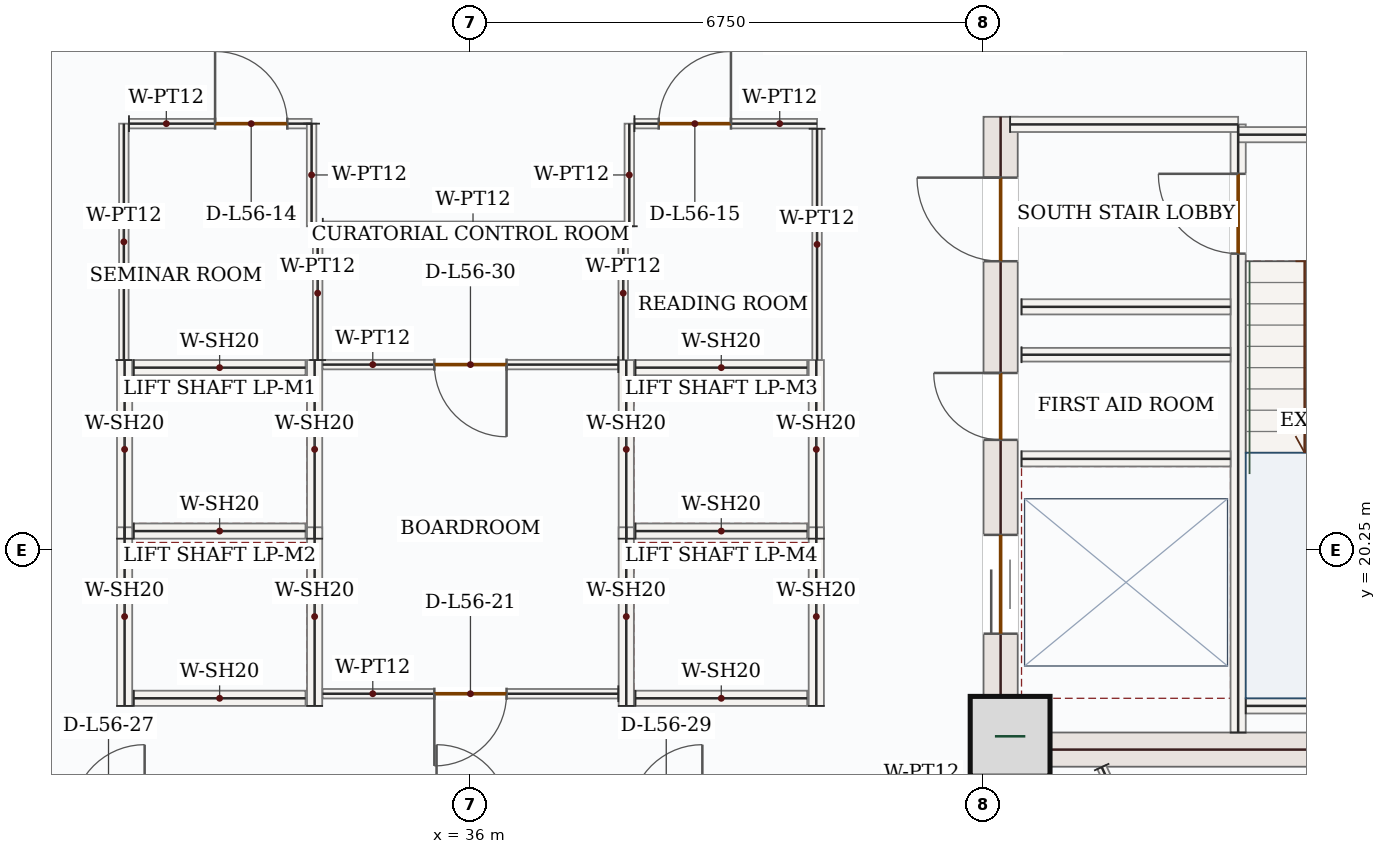
"""IFC4 building model, lengths in metres.
Left out: names, types, materials, properties, quantities, classifications, styles, units other than length and angle.
Written with IfcOpenShell. Run it as: python <this file> out.ifc"""

import sys

from ifc_helpers import new_model, si_unit, direction, frame, frame_2d, origin, origin_2d, place, context, subcontext, project, spatial, rectangle, extrude, source, transform, mapped, element, fill, save


model = new_model("IFC4")
c1 = context("Model", 3, precision=1e-05, world=origin(), true_north=direction((0.0, 1.0)))
c2 = subcontext(c1, "Body", "Model", "MODEL_VIEW")
j1 = project(units=[si_unit("LENGTHUNIT", "METRE"), si_unit("PLANEANGLEUNIT", "RADIAN")], contexts=[c1])
p1 = place(None, origin())
s1 = spatial("IfcSite", under=j1, at=p1, CompositionType="ELEMENT")
p2 = place(p1, origin())
s2 = spatial("IfcBuilding", under=s1, at=p2, CompositionType="ELEMENT")
p3 = place(p2, frame((0.0, 0.0, 239.1)))
s3 = spatial("IfcBuildingStorey", under=s2, at=p3, CompositionType="ELEMENT", Elevation=239.1)
p4 = place(p3, frame((42.975, 17.4, 0.0), z_axis=(0.0, 0.0, 1.0), x_axis=(0.0, 1.0, 0.0)))
e1 = element("IfcWall", 1, at=p4, inside=s3, PredefinedType="SHEAR", context=c2, shape_type="SweptSolid", body=[
    extrude(rectangle(XDim=8.55, YDim=0.45, at=frame_2d((4.275, 0.0))), origin(), (0.0, 0.0, 1.0), 3.5),
])
p5 = place(p4, frame((6.65, 0.0, 0.0)))
e2 = element("IfcOpeningElement", 2, at=p5, cuts=e1, PredefinedType="OPENING", context=c2, shape_type="SweptSolid", body=[
    extrude(rectangle(XDim=1.1, YDim=2.2, at=frame_2d((0.55, 1.1))), frame((0.0, 0.235, 0.0), z_axis=(0.0, -1.0, 0.0), x_axis=(1.0, 0.0, 0.0)), (0.0, 0.0, 1.0), 0.47),
])
p6 = place(p4, frame((1.75, 0.0, 0.0)))
e3 = element("IfcOpeningElement", 3, at=p6, cuts=e1, PredefinedType="OPENING", context=c2, shape_type="SweptSolid", body=[
    extrude(rectangle(XDim=1.3, YDim=2.2, at=frame_2d((0.65, 1.1))), frame((0.0, 0.235, 0.0), z_axis=(0.0, -1.0, 0.0), x_axis=(1.0, 0.0, 0.0)), (0.0, 0.0, 1.0), 0.47),
])
p7 = place(p4, frame((4.3, 0.0, 0.0)))
e4 = element("IfcOpeningElement", 4, at=p7, cuts=e1, PredefinedType="OPENING", context=c2, shape_type="SweptSolid", body=[
    extrude(rectangle(XDim=0.88, YDim=2.1, at=frame_2d((0.44, 1.05))), frame((0.0, 0.235, 0.0), z_axis=(0.0, -1.0, 0.0), x_axis=(1.0, 0.0, 0.0)), (0.0, 0.0, 1.0), 0.47),
])
m1 = source(origin(), c2, "Body", "SweptSolid", [
    extrude(rectangle(XDim=7.1, YDim=0.45, at=frame_2d((3.55, 0.0))), origin(), (0.0, 0.0, 1.0), 3.5),
])
p8 = place(p3, frame((43.2, 17.625, 0.0), z_axis=(0.0, 0.0, 1.0), x_axis=(1.0, 0.0, 0.0)))
e5 = element("IfcWall", 5, at=p8, inside=s3, PredefinedType="SHEAR", context=c2, shape_type="MappedRepresentation", body=[
    mapped(m1, transform((0.0, 0.0, 0.0), x_axis=(1.0, 0.0, 0.0), y_axis=(0.0, 1.0, 0.0), z_axis=(0.0, 0.0, 1.0), scale=1.0)),
])
m2 = source(origin(), c2, "Body", "SweptSolid", [
    extrude(rectangle(XDim=1.05, YDim=1.05, at=origin_2d()), origin(), (0.0, 0.0, 1.0), 3.75),
])
p9 = place(p3, frame((43.1, 17.8, 0.0), z_axis=(0.0, 0.0, 1.0), x_axis=(1.0, 0.0, 0.0)))
e6 = element("IfcColumn", 6, at=p9, inside=s3, PredefinedType="COLUMN", context=c2, shape_type="MappedRepresentation", body=[
    mapped(m2, transform((0.0, 0.0, 0.0), x_axis=(1.0, 0.0, 0.0), y_axis=(0.0, 1.0, 0.0), z_axis=(0.0, 0.0, 1.0), scale=1.0)),
])
p10 = place(p3, frame((46.1, 17.85, 0.0), z_axis=(0.0, 0.0, 1.0), x_axis=(0.0, 1.0, 0.0)))
e7 = element("IfcWall", 7, at=p10, inside=s3, PredefinedType="SOLIDWALL", context=c2, shape_type="SweptSolid", body=[
    extrude(rectangle(XDim=8.0, YDim=0.2, at=frame_2d((4.0, 0.0))), origin(), (0.0, 0.0, 1.0), 3.5),
])
p11 = place(p10, frame((6.3, 0.0, 0.0)))
e8 = element("IfcOpeningElement", 8, at=p11, cuts=e7, PredefinedType="OPENING", context=c2, shape_type="SweptSolid", body=[
    extrude(rectangle(XDim=1.05, YDim=2.15, at=frame_2d((0.525, 1.075))), frame((0.0, 0.11, 0.0), z_axis=(0.0, -1.0, 0.0), x_axis=(1.0, 0.0, 0.0)), (0.0, 0.0, 1.0), 0.22),
])
m3 = source(origin(), c2, "Body", "SweptSolid", [
    extrude(rectangle(XDim=3.0, YDim=0.2, at=frame_2d((1.5, 0.0))), origin(), (0.0, 0.0, 1.0), 3.5),
])
p12 = place(p3, frame((43.1, 25.85, 0.0), z_axis=(0.0, 0.0, 1.0), x_axis=(1.0, 0.0, 0.0)))
e9 = element("IfcWall", 9, at=p12, inside=s3, PredefinedType="SOLIDWALL", context=c2, shape_type="MappedRepresentation", body=[
    mapped(m3, transform((0.0, 0.0, 0.0), x_axis=(1.0, 0.0, 0.0), y_axis=(0.0, 1.0, 0.0), z_axis=(0.0, 0.0, 1.0), scale=1.0)),
])
m4 = source(origin(), c2, "Body", "SweptSolid", [
    extrude(rectangle(XDim=4.25, YDim=0.2, at=frame_2d((2.125, 0.0))), origin(), (0.0, 0.0, 1.0), 3.5),
])
p13 = place(p3, frame((46.1, 25.715, 0.0), z_axis=(0.0, 0.0, 1.0), x_axis=(1.0, 0.0, 0.0)))
e10 = element("IfcWall", 10, at=p13, inside=s3, PredefinedType="SOLIDWALL", context=c2, shape_type="MappedRepresentation", body=[
    mapped(m4, transform((0.0, 0.0, 0.0), x_axis=(1.0, 0.0, 0.0), y_axis=(0.0, 1.0, 0.0), z_axis=(0.0, 0.0, 1.0), scale=1.0)),
])
m5 = source(origin(), c2, "Body", "SweptSolid", [
    extrude(rectangle(XDim=3.25, YDim=0.2, at=frame_2d((1.625, 0.0))), origin(), (0.0, 0.0, 1.0), 3.5),
])
p14 = place(p3, frame((46.2, 18.2, 0.0), z_axis=(0.0, 0.0, 1.0), x_axis=(1.0, 0.0, 0.0)))
e11 = element("IfcWall", 11, at=p14, inside=s3, PredefinedType="SOLIDWALL", context=c2, shape_type="MappedRepresentation", body=[
    mapped(m5, transform((0.0, 0.0, 0.0), x_axis=(1.0, 0.0, 0.0), y_axis=(0.0, 1.0, 0.0), z_axis=(0.0, 0.0, 1.0), scale=1.0)),
])
m6 = source(origin(), c2, "Body", "SweptSolid", [
    extrude(rectangle(XDim=2.75, YDim=0.2, at=frame_2d((1.375, 0.0))), origin(), (0.0, 0.0, 1.0), 3.5),
])
for number, where, z_axis, x_axis in (
    (12, (43.25, 23.45, 0.0), (0.0, 0.0, 1.0), (1.0, 0.0, 0.0)),
    (13, (43.25, 21.45, 0.0), (0.0, 0.0, 1.0), (1.0, 0.0, 0.0)),
):
    element("IfcWall", number, at=place(p3, frame(where, z_axis=z_axis, x_axis=x_axis)), inside=s3, PredefinedType="SOLIDWALL", context=c2, shape_type="MappedRepresentation", body=[
        mapped(m6, transform((0.0, 0.0, 0.0), x_axis=(1.0, 0.0, 0.0), y_axis=(0.0, 1.0, 0.0), z_axis=(0.0, 0.0, 1.0), scale=1.0)),
    ])
m7 = source(origin(), c2, "Body", "SweptSolid", [
    extrude(rectangle(XDim=2.75, YDim=0.18, at=frame_2d((1.375, 0.0))), origin(), (0.0, 0.0, 1.0), 3.5),
])
p15 = place(p3, frame((43.25, 22.82, 0.0), z_axis=(0.0, 0.0, 1.0), x_axis=(1.0, 0.0, 0.0)))
e14 = element("IfcWall", 14, at=p15, inside=s3, PredefinedType="PARTITIONING", context=c2, shape_type="MappedRepresentation", body=[
    mapped(m7, transform((0.0, 0.0, 0.0), x_axis=(1.0, 0.0, 0.0), y_axis=(0.0, 1.0, 0.0), z_axis=(0.0, 0.0, 1.0), scale=1.0)),
])
m8 = source(origin(), c2, "Body", "SweptSolid", [
    extrude(rectangle(XDim=2.35, YDim=0.2, at=frame_2d((1.175, 0.0))), origin(), (0.0, 0.0, 1.0), 3.5),
])
for number, where, z_axis, x_axis in (
    (15, (31.45, 20.4, 0.0), (0.0, 0.0, 1.0), (0.0, 1.0, 0.0)),
    (16, (33.95, 20.4, 0.0), (0.0, 0.0, 1.0), (0.0, 1.0, 0.0)),
):
    element("IfcWall", number, at=place(p3, frame(where, z_axis=z_axis, x_axis=x_axis)), inside=s3, PredefinedType="SOLIDWALL", context=c2, shape_type="MappedRepresentation", body=[
        mapped(m8, transform((0.0, 0.0, 0.0), x_axis=(1.0, 0.0, 0.0), y_axis=(0.0, 1.0, 0.0), z_axis=(0.0, 0.0, 1.0), scale=1.0)),
    ])
m9 = source(origin(), c2, "Body", "SweptSolid", [
    extrude(rectangle(XDim=2.26, YDim=0.2, at=frame_2d((1.13, 0.0))), origin(), (0.0, 0.0, 1.0), 3.5),
])
for number, where, z_axis, x_axis in (
    (17, (31.57, 20.5, 0.0), (0.0, 0.0, 1.0), (1.0, 0.0, 0.0)),
    (18, (31.57, 22.65, 0.0), (0.0, 0.0, 1.0), (1.0, 0.0, 0.0)),
):
    element("IfcWall", number, at=place(p3, frame(where, z_axis=z_axis, x_axis=x_axis)), inside=s3, PredefinedType="SOLIDWALL", context=c2, shape_type="MappedRepresentation", body=[
        mapped(m9, transform((0.0, 0.0, 0.0), x_axis=(1.0, 0.0, 0.0), y_axis=(0.0, 1.0, 0.0), z_axis=(0.0, 0.0, 1.0), scale=1.0)),
    ])
for number, where, z_axis, x_axis in (
    (19, (31.45, 18.2, 0.0), (0.0, 0.0, 1.0), (0.0, 1.0, 0.0)),
    (20, (33.95, 18.2, 0.0), (0.0, 0.0, 1.0), (0.0, 1.0, 0.0)),
):
    element("IfcWall", number, at=place(p3, frame(where, z_axis=z_axis, x_axis=x_axis)), inside=s3, PredefinedType="SOLIDWALL", context=c2, shape_type="MappedRepresentation", body=[
        mapped(m8, transform((0.0, 0.0, 0.0), x_axis=(1.0, 0.0, 0.0), y_axis=(0.0, 1.0, 0.0), z_axis=(0.0, 0.0, 1.0), scale=1.0)),
    ])
p16 = place(p3, frame((31.57, 18.3, 0.0), z_axis=(0.0, 0.0, 1.0), x_axis=(1.0, 0.0, 0.0)))
e21 = element("IfcWall", 21, at=p16, inside=s3, PredefinedType="SOLIDWALL", context=c2, shape_type="MappedRepresentation", body=[
    mapped(m9, transform((0.0, 0.0, 0.0), x_axis=(1.0, 0.0, 0.0), y_axis=(0.0, 1.0, 0.0), z_axis=(0.0, 0.0, 1.0), scale=1.0)),
])
for number, where, z_axis, x_axis in (
    (22, (38.05, 20.4, 0.0), (0.0, 0.0, 1.0), (0.0, 1.0, 0.0)),
    (23, (40.55, 20.4, 0.0), (0.0, 0.0, 1.0), (0.0, 1.0, 0.0)),
):
    element("IfcWall", number, at=place(p3, frame(where, z_axis=z_axis, x_axis=x_axis)), inside=s3, PredefinedType="SOLIDWALL", context=c2, shape_type="MappedRepresentation", body=[
        mapped(m8, transform((0.0, 0.0, 0.0), x_axis=(1.0, 0.0, 0.0), y_axis=(0.0, 1.0, 0.0), z_axis=(0.0, 0.0, 1.0), scale=1.0)),
    ])
for number, where, z_axis, x_axis in (
    (24, (38.17, 20.5, 0.0), (0.0, 0.0, 1.0), (1.0, 0.0, 0.0)),
    (25, (38.17, 22.65, 0.0), (0.0, 0.0, 1.0), (1.0, 0.0, 0.0)),
):
    element("IfcWall", number, at=place(p3, frame(where, z_axis=z_axis, x_axis=x_axis)), inside=s3, PredefinedType="SOLIDWALL", context=c2, shape_type="MappedRepresentation", body=[
        mapped(m9, transform((0.0, 0.0, 0.0), x_axis=(1.0, 0.0, 0.0), y_axis=(0.0, 1.0, 0.0), z_axis=(0.0, 0.0, 1.0), scale=1.0)),
    ])
for number, where, z_axis, x_axis in (
    (26, (38.05, 18.2, 0.0), (0.0, 0.0, 1.0), (0.0, 1.0, 0.0)),
    (27, (40.55, 18.2, 0.0), (0.0, 0.0, 1.0), (0.0, 1.0, 0.0)),
):
    element("IfcWall", number, at=place(p3, frame(where, z_axis=z_axis, x_axis=x_axis)), inside=s3, PredefinedType="SOLIDWALL", context=c2, shape_type="MappedRepresentation", body=[
        mapped(m8, transform((0.0, 0.0, 0.0), x_axis=(1.0, 0.0, 0.0), y_axis=(0.0, 1.0, 0.0), z_axis=(0.0, 0.0, 1.0), scale=1.0)),
    ])
p17 = place(p3, frame((38.17, 18.3, 0.0), z_axis=(0.0, 0.0, 1.0), x_axis=(1.0, 0.0, 0.0)))
e28 = element("IfcWall", 28, at=p17, inside=s3, PredefinedType="SOLIDWALL", context=c2, shape_type="MappedRepresentation", body=[
    mapped(m9, transform((0.0, 0.0, 0.0), x_axis=(1.0, 0.0, 0.0), y_axis=(0.0, 1.0, 0.0), z_axis=(0.0, 0.0, 1.0), scale=1.0)),
])
p18 = place(p3, frame((37.945, 22.69, 0.0), z_axis=(0.0, 0.0, 1.0), x_axis=(-1.0, 0.0, 0.0)))
e29 = element("IfcWall", 29, at=p18, inside=s3, PredefinedType="PARTITIONING", context=c2, shape_type="SweptSolid", body=[
    extrude(rectangle(XDim=3.89, YDim=0.125, at=frame_2d((1.945, 0.0))), origin(), (0.0, 0.0, 1.0), 3.5),
])
p19 = place(p18, frame((1.47, 0.0, 0.0)))
e30 = element("IfcOpeningElement", 30, at=p19, cuts=e29, PredefinedType="OPENING", context=c2, shape_type="SweptSolid", body=[
    extrude(rectangle(XDim=0.95, YDim=2.15, at=frame_2d((0.475, 1.075))), frame((0.0, 0.073, 0.0), z_axis=(0.0, -1.0, 0.0), x_axis=(1.0, 0.0, 0.0)), (0.0, 0.0, 1.0), 0.145),
])
m10 = source(origin(), c2, "Body", "SweptSolid", [
    extrude(rectangle(XDim=1.76, YDim=0.125, at=frame_2d((0.88, 0.0))), origin(), (0.0, 0.0, 1.0), 3.5),
])
p20 = place(p3, frame((33.99, 22.75, 0.0), z_axis=(0.0, 0.0, 1.0), x_axis=(0.0, 1.0, 0.0)))
e31 = element("IfcWall", 31, at=p20, inside=s3, PredefinedType="PARTITIONING", context=c2, shape_type="MappedRepresentation", body=[
    mapped(m10, transform((0.0, 0.0, 0.0), x_axis=(1.0, 0.0, 0.0), y_axis=(0.0, 1.0, 0.0), z_axis=(0.0, 0.0, 1.0), scale=1.0)),
])
m11 = source(origin(), c2, "Body", "SweptSolid", [
    extrude(rectangle(XDim=3.952, YDim=0.125, at=frame_2d((1.976, 0.0))), origin(), (0.0, 0.0, 1.0), 3.5),
])
p21 = place(p3, frame((34.058, 24.51, 0.0), z_axis=(0.0, 0.0, 1.0), x_axis=(1.0, 0.0, 0.0)))
e32 = element("IfcWall", 32, at=p21, inside=s3, PredefinedType="PARTITIONING", context=c2, shape_type="MappedRepresentation", body=[
    mapped(m11, transform((0.0, 0.0, 0.0), x_axis=(1.0, 0.0, 0.0), y_axis=(0.0, 1.0, 0.0), z_axis=(0.0, 0.0, 1.0), scale=1.0)),
])
p22 = place(p3, frame((38.01, 24.51, 0.0), z_axis=(0.0, 0.0, 1.0), x_axis=(0.0, -1.0, 0.0)))
e33 = element("IfcWall", 33, at=p22, inside=s3, PredefinedType="PARTITIONING", context=c2, shape_type="MappedRepresentation", body=[
    mapped(m10, transform((0.0, 0.0, 0.0), x_axis=(1.0, 0.0, 0.0), y_axis=(0.0, 1.0, 0.0), z_axis=(0.0, 0.0, 1.0), scale=1.0)),
])
m12 = source(origin(), c2, "Body", "SweptSolid", [
    extrude(rectangle(XDim=3.11, YDim=0.125, at=frame_2d((1.555, 0.0))), origin(), (0.0, 0.0, 1.0), 3.5),
])
p23 = place(p3, frame((31.44, 22.75, 0.0), z_axis=(0.0, 0.0, 1.0), x_axis=(0.0, 1.0, 0.0)))
e34 = element("IfcWall", 34, at=p23, inside=s3, PredefinedType="PARTITIONING", context=c2, shape_type="MappedRepresentation", body=[
    mapped(m12, transform((0.0, 0.0, 0.0), x_axis=(1.0, 0.0, 0.0), y_axis=(0.0, 1.0, 0.0), z_axis=(0.0, 0.0, 1.0), scale=1.0)),
])
p24 = place(p3, frame((31.508, 25.86, 0.0), z_axis=(0.0, 0.0, 1.0), x_axis=(1.0, 0.0, 0.0)))
e35 = element("IfcWall", 35, at=p24, inside=s3, PredefinedType="PARTITIONING", context=c2, shape_type="SweptSolid", body=[
    extrude(rectangle(XDim=2.402, YDim=0.125, at=frame_2d((1.201, 0.0))), origin(), (0.0, 0.0, 1.0), 3.5),
])
p25 = place(p24, frame((1.133, 0.0, 0.0)))
e36 = element("IfcOpeningElement", 36, at=p25, cuts=e35, PredefinedType="OPENING", context=c2, shape_type="SweptSolid", body=[
    extrude(rectangle(XDim=0.95, YDim=2.15, at=frame_2d((0.475, 1.075))), frame((0.0, 0.073, 0.0), z_axis=(0.0, -1.0, 0.0), x_axis=(1.0, 0.0, 0.0)), (0.0, 0.0, 1.0), 0.145),
])
m13 = source(origin(), c2, "Body", "SweptSolid", [
    extrude(rectangle(XDim=1.35, YDim=0.125, at=frame_2d((0.675, 0.0))), origin(), (0.0, 0.0, 1.0), 3.5),
])
for number, where, z_axis, x_axis in (
    (37, (33.91, 25.86, 0.0), (0.0, 0.0, 1.0), (0.0, -1.0, 0.0)),
    (38, (38.09, 24.51, 0.0), (0.0, 0.0, 1.0), (0.0, 1.0, 0.0)),
):
    element("IfcWall", number, at=place(p3, frame(where, z_axis=z_axis, x_axis=x_axis)), inside=s3, PredefinedType="PARTITIONING", context=c2, shape_type="MappedRepresentation", body=[
        mapped(m13, transform((0.0, 0.0, 0.0), x_axis=(1.0, 0.0, 0.0), y_axis=(0.0, 1.0, 0.0), z_axis=(0.0, 0.0, 1.0), scale=1.0)),
    ])
p26 = place(p3, frame((38.157, 25.86, 0.0), z_axis=(0.0, 0.0, 1.0), x_axis=(1.0, 0.0, 0.0)))
e39 = element("IfcWall", 39, at=p26, inside=s3, PredefinedType="PARTITIONING", context=c2, shape_type="SweptSolid", body=[
    extrude(rectangle(XDim=2.403, YDim=0.125, at=frame_2d((1.201, 0.0))), origin(), (0.0, 0.0, 1.0), 3.5),
])
p27 = place(p26, frame((0.32, 0.0, 0.0)))
e40 = element("IfcOpeningElement", 40, at=p27, cuts=e39, PredefinedType="OPENING", context=c2, shape_type="SweptSolid", body=[
    extrude(rectangle(XDim=0.95, YDim=2.15, at=frame_2d((0.475, 1.075))), frame((0.0, 0.073, 0.0), z_axis=(0.0, -1.0, 0.0), x_axis=(1.0, 0.0, 0.0)), (0.0, 0.0, 1.0), 0.145),
])
m14 = source(origin(), c2, "Body", "SweptSolid", [
    extrude(rectangle(XDim=3.042, YDim=0.125, at=frame_2d((1.521, 0.0))), origin(), (0.0, 0.0, 1.0), 3.5),
])
p28 = place(p3, frame((40.56, 25.792, 0.0), z_axis=(0.0, 0.0, 1.0), x_axis=(0.0, -1.0, 0.0)))
e41 = element("IfcWall", 41, at=p28, inside=s3, PredefinedType="PARTITIONING", context=c2, shape_type="MappedRepresentation", body=[
    mapped(m14, transform((0.0, 0.0, 0.0), x_axis=(1.0, 0.0, 0.0), y_axis=(0.0, 1.0, 0.0), z_axis=(0.0, 0.0, 1.0), scale=1.0)),
])
p29 = place(p3, frame((37.945, 18.36, 0.0), z_axis=(0.0, 0.0, 1.0), x_axis=(-1.0, 0.0, 0.0)))
e42 = element("IfcWall", 42, at=p29, inside=s3, PredefinedType="PARTITIONING", context=c2, shape_type="SweptSolid", body=[
    extrude(rectangle(XDim=3.89, YDim=0.125, at=frame_2d((1.945, 0.0))), origin(), (0.0, 0.0, 1.0), 3.5),
])
p30 = place(p29, frame((1.47, 0.0, 0.0)))
e43 = element("IfcOpeningElement", 43, at=p30, cuts=e42, PredefinedType="OPENING", context=c2, shape_type="SweptSolid", body=[
    extrude(rectangle(XDim=0.95, YDim=2.15, at=frame_2d((0.475, 1.075))), frame((0.0, 0.073, 0.0), z_axis=(0.0, -1.0, 0.0), x_axis=(1.0, 0.0, 0.0)), (0.0, 0.0, 1.0), 0.145),
])
m15 = source(origin(), c2, "Body", "SweptSolid", [
    extrude(rectangle(XDim=8.712, YDim=0.125, at=frame_2d((4.356, 0.0))), origin(), (0.0, 0.0, 1.0), 3.5),
])
p31 = place(p3, frame((44.305, 17.395, 0.0), z_axis=(0.0, 0.0, 1.0), x_axis=(0.419438424399, -0.907783789312, 0.0)))
e44 = element("IfcWall", 44, at=p31, inside=s3, PredefinedType="PARTITIONING", context=c2, shape_type="MappedRepresentation", body=[
    mapped(m15, transform((0.0, 0.0, 0.0), x_axis=(1.0, 0.0, 0.0), y_axis=(0.0, 1.0, 0.0), z_axis=(0.0, 0.0, 1.0), scale=1.0)),
])
m16 = source(origin(), c2, "Body", "SweptSolid", [
    extrude(rectangle(XDim=1.05, YDim=2.15, at=frame_2d((0.525, 1.075))), frame((0.0, 0.025, 0.0), z_axis=(0.0, -1.0, 0.0), x_axis=(1.0, 0.0, 0.0)), (0.0, 0.0, 1.0), 0.05),
])
p32 = place(p11, origin())
e45 = element("IfcDoor", 45, at=p32, inside=s3, OperationType="SINGLE_SWING_RIGHT", PredefinedType="DOOR", context=c2, shape_type="MappedRepresentation", body=[
    mapped(m16, transform((0.0, 0.0, 0.0), x_axis=(1.0, 0.0, 0.0), y_axis=(0.0, 1.0, 0.0), z_axis=(0.0, 0.0, 1.0), scale=1.0)),
])
fill(e8, e45)
m17 = source(origin(), c2, "Body", "SweptSolid", [
    extrude(rectangle(XDim=1.1, YDim=2.2, at=frame_2d((0.55, 1.1))), frame((0.0, 0.025, 0.0), z_axis=(0.0, -1.0, 0.0), x_axis=(1.0, 0.0, 0.0)), (0.0, 0.0, 1.0), 0.05),
])
p33 = place(p5, origin())
e46 = element("IfcDoor", 46, at=p33, inside=s3, OperationType="SINGLE_SWING_RIGHT", PredefinedType="DOOR", context=c2, shape_type="MappedRepresentation", body=[
    mapped(m17, transform((0.0, 0.0, 0.0), x_axis=(1.0, 0.0, 0.0), y_axis=(0.0, 1.0, 0.0), z_axis=(0.0, 0.0, 1.0), scale=1.0)),
])
fill(e2, e46)
m18 = source(origin(), c2, "Body", "SweptSolid", [
    extrude(rectangle(XDim=1.3, YDim=2.2, at=frame_2d((0.65, 1.1))), frame((0.0, 0.025, 0.0), z_axis=(0.0, -1.0, 0.0), x_axis=(1.0, 0.0, 0.0)), (0.0, 0.0, 1.0), 0.05),
])
p34 = place(p6, origin())
e47 = element("IfcDoor", 47, at=p34, inside=s3, OperationType="DOUBLE_DOOR_SLIDING", PredefinedType="DOOR", context=c2, shape_type="MappedRepresentation", body=[
    mapped(m18, transform((0.0, 0.0, 0.0), x_axis=(1.0, 0.0, 0.0), y_axis=(0.0, 1.0, 0.0), z_axis=(0.0, 0.0, 1.0), scale=1.0)),
])
fill(e3, e47)
m19 = source(origin(), c2, "Body", "SweptSolid", [
    extrude(rectangle(XDim=0.88, YDim=2.1, at=frame_2d((0.44, 1.05))), frame((0.0, 0.025, 0.0), z_axis=(0.0, -1.0, 0.0), x_axis=(1.0, 0.0, 0.0)), (0.0, 0.0, 1.0), 0.05),
])
p35 = place(p7, origin())
e48 = element("IfcDoor", 48, at=p35, inside=s3, OperationType="SINGLE_SWING_RIGHT", PredefinedType="DOOR", context=c2, shape_type="MappedRepresentation", body=[
    mapped(m19, transform((0.0, 0.0, 0.0), x_axis=(1.0, 0.0, 0.0), y_axis=(0.0, 1.0, 0.0), z_axis=(0.0, 0.0, 1.0), scale=1.0)),
])
fill(e4, e48)
m20 = source(origin(), c2, "Body", "SweptSolid", [
    extrude(rectangle(XDim=0.95, YDim=2.15, at=frame_2d((0.475, 1.075))), frame((0.0, 0.025, 0.0), z_axis=(0.0, -1.0, 0.0), x_axis=(1.0, 0.0, 0.0)), (0.0, 0.0, 1.0), 0.05),
])
p36 = place(p25, origin())
e49 = element("IfcDoor", 49, at=p36, inside=s3, OperationType="SINGLE_SWING_LEFT", PredefinedType="DOOR", context=c2, shape_type="MappedRepresentation", body=[
    mapped(m20, transform((0.0, 0.0, 0.0), x_axis=(1.0, 0.0, 0.0), y_axis=(0.0, 1.0, 0.0), z_axis=(0.0, 0.0, 1.0), scale=1.0)),
])
fill(e36, e49)
p37 = place(p27, origin())
e50 = element("IfcDoor", 50, at=p37, inside=s3, OperationType="SINGLE_SWING_RIGHT", PredefinedType="DOOR", context=c2, shape_type="MappedRepresentation", body=[
    mapped(m20, transform((0.0, 0.0, 0.0), x_axis=(1.0, 0.0, 0.0), y_axis=(0.0, 1.0, 0.0), z_axis=(0.0, 0.0, 1.0), scale=1.0)),
])
fill(e40, e50)
p38 = place(p30, origin())
e51 = element("IfcDoor", 51, at=p38, inside=s3, OperationType="SINGLE_SWING_RIGHT", PredefinedType="DOOR", context=c2, shape_type="MappedRepresentation", body=[
    mapped(m20, transform((0.0, 0.0, 0.0), x_axis=(1.0, 0.0, 0.0), y_axis=(0.0, 1.0, 0.0), z_axis=(0.0, 0.0, 1.0), scale=1.0)),
])
fill(e43, e51)
p39 = place(p19, origin())
e52 = element("IfcDoor", 52, at=p39, inside=s3, OperationType="SINGLE_SWING_LEFT", PredefinedType="DOOR", context=c2, shape_type="MappedRepresentation", body=[
    mapped(m20, transform((0.0, 0.0, 0.0), x_axis=(1.0, 0.0, 0.0), y_axis=(0.0, 1.0, 0.0), z_axis=(0.0, 0.0, 1.0), scale=1.0)),
])
fill(e30, e52)
save(model, sys.argv[1])
